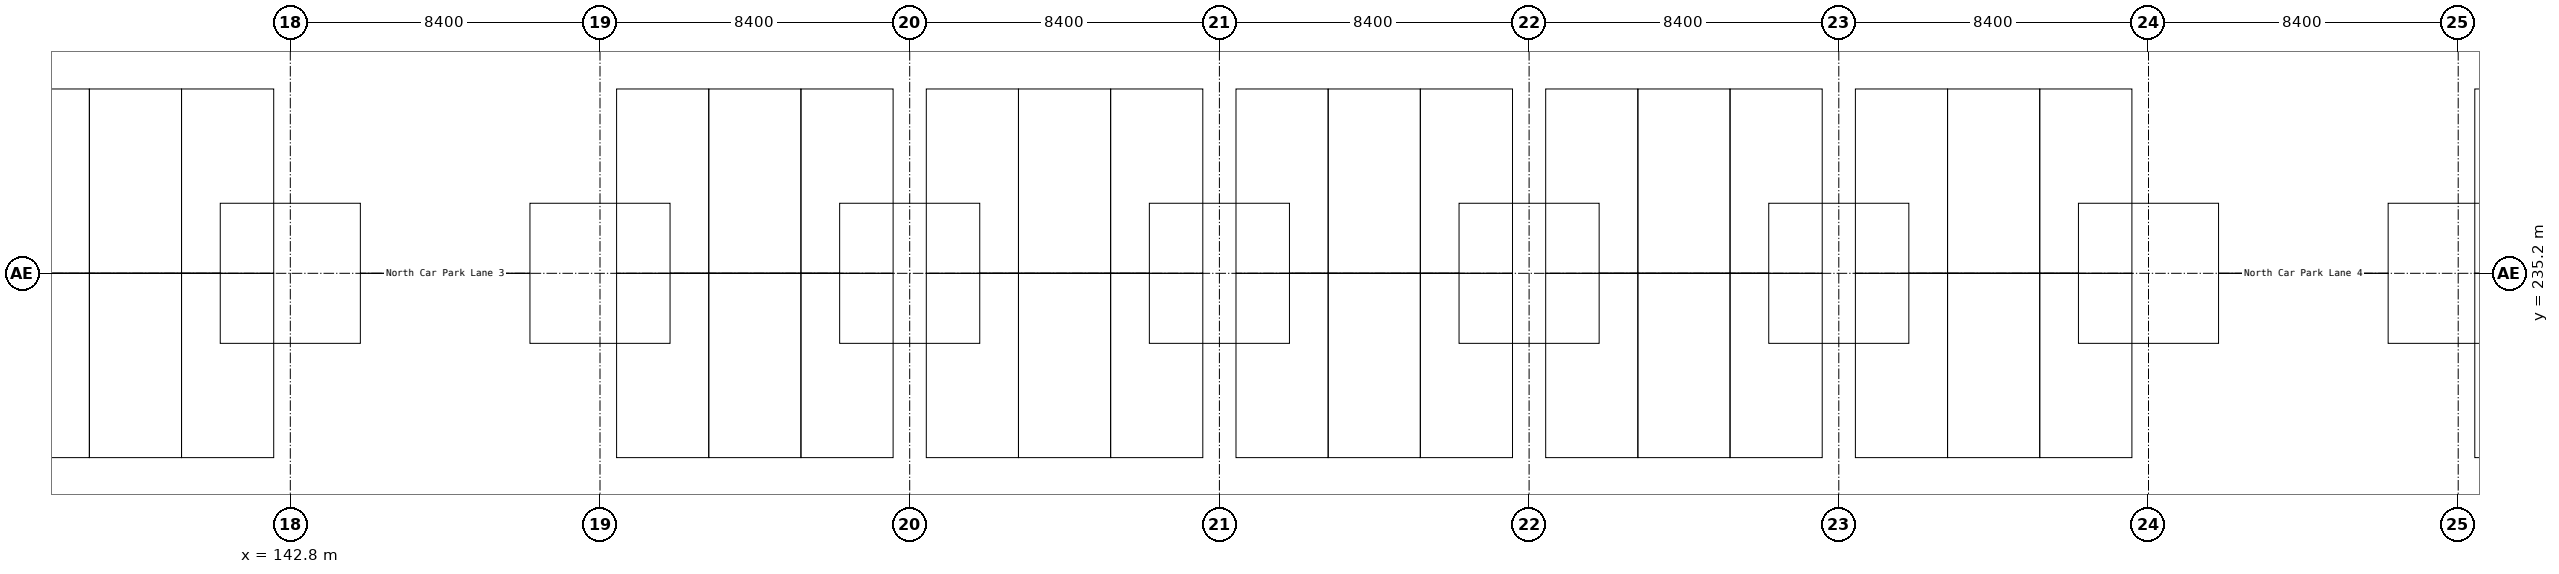
"""IFC4 building model, lengths in metres.
Left out: names, types, materials, properties, quantities, classifications, styles, units other than length and angle.
Written with IfcOpenShell. Run it as: python <this file> out.ifc"""

import sys

from ifc_helpers import new_model, si_unit, direction, frame, origin, origin_2d, place, context, subcontext, project, spatial, rectangle, extrude, element, save


model = new_model("IFC4")
c1 = context("Model", 3, precision=1e-05, world=origin(), true_north=direction((0.0, 1.0)))
c2 = subcontext(c1, "Body", "Model", "MODEL_VIEW")
j1 = project(units=[si_unit("LENGTHUNIT", "METRE"), si_unit("PLANEANGLEUNIT", "RADIAN")], contexts=[c1])
p1 = place(None, origin())
s1 = spatial("IfcSite", under=j1, at=p1, CompositionType="ELEMENT")
p2 = place(p1, origin())
s2 = spatial("IfcBuilding", under=s1, at=p2, CompositionType="ELEMENT")
p3 = place(p2, frame((0.0, 0.0, -3.0)))
s3 = spatial("IfcBuildingStorey", under=s2, at=p3, CompositionType="ELEMENT", Elevation=-3.0)
for number, where, z_axis, x_axis in (
    (1, (142.8, 235.2, 0.0), (0.0, 0.0, 1.0), (1.0, 0.0, 0.0)),
    (2, (151.2, 235.2, 0.0), (0.0, 0.0, 1.0), (1.0, 0.0, 0.0)),
    (3, (159.6, 235.2, 0.0), (0.0, 0.0, 1.0), (1.0, 0.0, 0.0)),
    (4, (168.0, 235.2, 0.0), (0.0, 0.0, 1.0), (1.0, 0.0, 0.0)),
    (5, (176.4, 235.2, 0.0), (0.0, 0.0, 1.0), (1.0, 0.0, 0.0)),
    (6, (184.8, 235.2, 0.0), (0.0, 0.0, 1.0), (1.0, 0.0, 0.0)),
    (7, (193.2, 235.2, 0.0), (0.0, 0.0, 1.0), (1.0, 0.0, 0.0)),
    (8, (201.6, 235.2, 0.0), (0.0, 0.0, 1.0), (1.0, 0.0, 0.0)),
):
    element("IfcColumn", number, at=place(p3, frame(where, z_axis=z_axis, x_axis=x_axis)), inside=s3, PredefinedType="COLUMN", context=c2, shape_type="SweptSolid", body=[
        extrude(rectangle(XDim=0.8, YDim=0.8, at=origin_2d()), origin(), (0.0, 0.0, 1.0), 2.4),
    ])
save(model, sys.argv[1])
